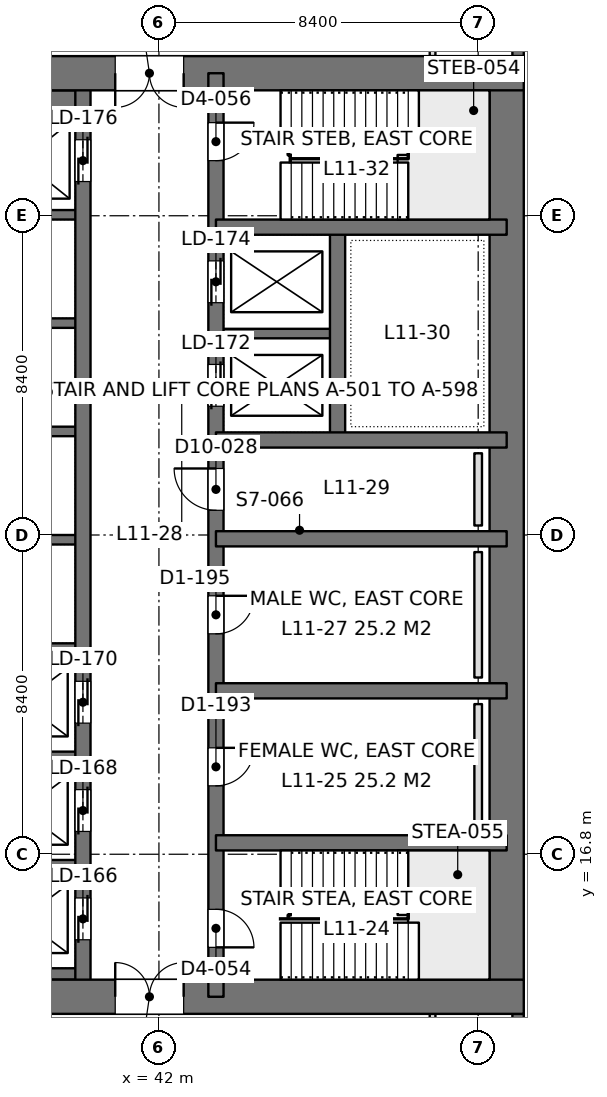
"""IFC4 building model, lengths in metres.
Left out: names, types, materials, properties, quantities, classifications, styles, units other than length and angle.
Written with IfcOpenShell. Run it as: python <this file> out.ifc"""

import sys

from ifc_helpers import new_model, si_unit, direction, frame, frame_2d, origin, place, context, subcontext, project, spatial, rectangle, extrude, element, fill, save


model = new_model("IFC4")
c1 = context("Model", 3, precision=1e-05, world=origin(), true_north=direction((0.0, 1.0)))
c2 = subcontext(c1, "Body", "Model", "MODEL_VIEW")
j1 = project(units=[si_unit("LENGTHUNIT", "METRE"), si_unit("PLANEANGLEUNIT", "RADIAN")], contexts=[c1])
p1 = place(None, origin())
s1 = spatial("IfcSite", under=j1, at=p1, CompositionType="ELEMENT")
p2 = place(p1, origin())
s2 = spatial("IfcBuilding", under=s1, at=p2, CompositionType="ELEMENT")
p3 = place(p2, frame((0.0, 0.0, 50.4)))
s3 = spatial("IfcBuildingStorey", under=s2, at=p3, CompositionType="ELEMENT", Elevation=50.4)
p4 = place(p3, frame((33.6, 13.05, 0.0), z_axis=(0.0, 0.0, 1.0), x_axis=(1.0, 0.0, 0.0)))
e1 = element("IfcWall", 1, at=p4, inside=s3, PredefinedType="SHEAR", context=c2, shape_type="SweptSolid", body=[
    extrude(rectangle(XDim=18.0, YDim=0.9, at=frame_2d((9.0, 0.0))), origin(), (0.0, 0.0, 1.0), 4.5),
])
p5 = place(p4, frame((7.25, 0.0, 0.0)))
e2 = element("IfcOpeningElement", 2, at=p5, cuts=e1, PredefinedType="OPENING", context=c2, shape_type="SweptSolid", body=[
    extrude(rectangle(XDim=1.8, YDim=2.4, at=frame_2d((0.9, 1.2))), frame((0.0, 0.46, 0.0), z_axis=(0.0, -1.0, 0.0), x_axis=(1.0, 0.0, 0.0)), (0.0, 0.0, 1.0), 0.92),
])
p6 = place(p3, frame((33.6, 37.35, 0.0), z_axis=(0.0, 0.0, 1.0), x_axis=(1.0, 0.0, 0.0)))
e3 = element("IfcWall", 3, at=p6, inside=s3, PredefinedType="SHEAR", context=c2, shape_type="SweptSolid", body=[
    extrude(rectangle(XDim=18.0, YDim=0.9, at=frame_2d((9.0, 0.0))), origin(), (0.0, 0.0, 1.0), 4.5),
])
p7 = place(p6, frame((7.25, 0.0, 0.0)))
e4 = element("IfcOpeningElement", 4, at=p7, cuts=e3, PredefinedType="OPENING", context=c2, shape_type="SweptSolid", body=[
    extrude(rectangle(XDim=1.8, YDim=2.4, at=frame_2d((0.9, 1.2))), frame((0.0, 0.46, 0.0), z_axis=(0.0, -1.0, 0.0), x_axis=(1.0, 0.0, 0.0)), (0.0, 0.0, 1.0), 0.92),
])
p8 = place(p3, frame((51.15, 13.05, 0.0), z_axis=(0.0, 0.0, 1.0), x_axis=(0.0, 1.0, 0.0)))
e5 = element("IfcWall", 5, at=p8, inside=s3, PredefinedType="SHEAR", context=c2, shape_type="SweptSolid", body=[
    extrude(rectangle(XDim=24.3, YDim=0.9, at=frame_2d((12.15, 0.0))), origin(), (0.0, 0.0, 1.0), 4.5),
])
p9 = place(p3, frame((43.5, 13.05, 0.0), z_axis=(0.0, 0.0, 1.0), x_axis=(0.0, 1.0, 0.0)))
e6 = element("IfcWall", 6, at=p9, inside=s3, PredefinedType="SHEAR", context=c2, shape_type="SweptSolid", body=[
    extrude(rectangle(XDim=24.3, YDim=0.4, at=frame_2d((12.15, 0.0))), origin(), (0.0, 0.0, 1.0), 4.5),
])
p10 = place(p9, frame((1.3, 0.0, 0.0)))
e7 = element("IfcOpeningElement", 7, at=p10, cuts=e6, PredefinedType="OPENING", context=c2, shape_type="SweptSolid", body=[
    extrude(rectangle(XDim=1.0, YDim=2.2, at=frame_2d((0.5, 1.1))), frame((0.0, 0.21, 0.0), z_axis=(0.0, -1.0, 0.0), x_axis=(1.0, 0.0, 0.0)), (0.0, 0.0, 1.0), 0.42),
])
p11 = place(p9, frame((22.0, 0.0, 0.0)))
e8 = element("IfcOpeningElement", 8, at=p11, cuts=e6, PredefinedType="OPENING", context=c2, shape_type="SweptSolid", body=[
    extrude(rectangle(XDim=1.0, YDim=2.2, at=frame_2d((0.5, 1.1))), frame((0.0, 0.21, 0.0), z_axis=(0.0, -1.0, 0.0), x_axis=(1.0, 0.0, 0.0)), (0.0, 0.0, 1.0), 0.42),
])
p12 = place(p9, frame((5.55, 0.0, 0.0)))
e9 = element("IfcOpeningElement", 9, at=p12, cuts=e6, PredefinedType="OPENING", context=c2, shape_type="SweptSolid", body=[
    extrude(rectangle(XDim=1.0, YDim=2.2, at=frame_2d((0.5, 1.1))), frame((0.0, 0.21, 0.0), z_axis=(0.0, -1.0, 0.0), x_axis=(1.0, 0.0, 0.0)), (0.0, 0.0, 1.0), 0.42),
])
p13 = place(p9, frame((9.55, 0.0, 0.0)))
e10 = element("IfcOpeningElement", 10, at=p13, cuts=e6, PredefinedType="OPENING", context=c2, shape_type="SweptSolid", body=[
    extrude(rectangle(XDim=1.0, YDim=2.2, at=frame_2d((0.5, 1.1))), frame((0.0, 0.21, 0.0), z_axis=(0.0, -1.0, 0.0), x_axis=(1.0, 0.0, 0.0)), (0.0, 0.0, 1.0), 0.42),
])
p14 = place(p9, frame((12.8, 0.0, 0.0)))
e11 = element("IfcOpeningElement", 11, at=p14, cuts=e6, PredefinedType="OPENING", context=c2, shape_type="SweptSolid", body=[
    extrude(rectangle(XDim=1.1, YDim=2.2, at=frame_2d((0.55, 1.1))), frame((0.0, 0.21, 0.0), z_axis=(0.0, -1.0, 0.0), x_axis=(1.0, 0.0, 0.0)), (0.0, 0.0, 1.0), 0.42),
])
p15 = place(p9, frame((15.538, 0.0, 0.0)))
e12 = element("IfcOpeningElement", 12, at=p15, cuts=e6, PredefinedType="OPENING", context=c2, shape_type="SweptSolid", body=[
    extrude(rectangle(XDim=1.1, YDim=2.2, at=frame_2d((0.55, 1.1))), frame((0.0, 0.21, 0.0), z_axis=(0.0, -1.0, 0.0), x_axis=(1.0, 0.0, 0.0)), (0.0, 0.0, 1.0), 0.42),
])
p16 = place(p9, frame((18.262, 0.0, 0.0)))
e13 = element("IfcOpeningElement", 13, at=p16, cuts=e6, PredefinedType="OPENING", context=c2, shape_type="SweptSolid", body=[
    extrude(rectangle(XDim=1.1, YDim=2.2, at=frame_2d((0.55, 1.1))), frame((0.0, 0.21, 0.0), z_axis=(0.0, -1.0, 0.0), x_axis=(1.0, 0.0, 0.0)), (0.0, 0.0, 1.0), 0.42),
])
p17 = place(p3, frame((40.0, 13.05, 0.0), z_axis=(0.0, 0.0, 1.0), x_axis=(0.0, 1.0, 0.0)))
e14 = element("IfcWall", 14, at=p17, inside=s3, PredefinedType="SHEAR", context=c2, shape_type="SweptSolid", body=[
    extrude(rectangle(XDim=24.3, YDim=0.4, at=frame_2d((12.15, 0.0))), origin(), (0.0, 0.0, 1.0), 4.5),
])
p18 = place(p17, frame((1.5, 0.0, 0.0)))
e15 = element("IfcOpeningElement", 15, at=p18, cuts=e14, PredefinedType="OPENING", context=c2, shape_type="SweptSolid", body=[
    extrude(rectangle(XDim=1.1, YDim=2.2, at=frame_2d((0.55, 1.1))), frame((0.0, 0.21, 0.0), z_axis=(0.0, -1.0, 0.0), x_axis=(1.0, 0.0, 0.0)), (0.0, 0.0, 1.0), 0.42),
])
p19 = place(p17, frame((4.35, 0.0, 0.0)))
e16 = element("IfcOpeningElement", 16, at=p19, cuts=e14, PredefinedType="OPENING", context=c2, shape_type="SweptSolid", body=[
    extrude(rectangle(XDim=1.1, YDim=2.2, at=frame_2d((0.55, 1.1))), frame((0.0, 0.21, 0.0), z_axis=(0.0, -1.0, 0.0), x_axis=(1.0, 0.0, 0.0)), (0.0, 0.0, 1.0), 0.42),
])
p20 = place(p17, frame((7.2, 0.0, 0.0)))
e17 = element("IfcOpeningElement", 17, at=p20, cuts=e14, PredefinedType="OPENING", context=c2, shape_type="SweptSolid", body=[
    extrude(rectangle(XDim=1.1, YDim=2.2, at=frame_2d((0.55, 1.1))), frame((0.0, 0.21, 0.0), z_axis=(0.0, -1.0, 0.0), x_axis=(1.0, 0.0, 0.0)), (0.0, 0.0, 1.0), 0.42),
])
p21 = place(p17, frame((21.45, 0.0, 0.0)))
e18 = element("IfcOpeningElement", 18, at=p21, cuts=e14, PredefinedType="OPENING", context=c2, shape_type="SweptSolid", body=[
    extrude(rectangle(XDim=1.1, YDim=2.2, at=frame_2d((0.55, 1.1))), frame((0.0, 0.21, 0.0), z_axis=(0.0, -1.0, 0.0), x_axis=(1.0, 0.0, 0.0)), (0.0, 0.0, 1.0), 0.42),
])
for number, where, z_axis, x_axis in (
    (19, (51.15, 17.1, 0.0), (0.0, 0.0, 1.0), (-1.0, 0.0, 0.0)),
    (20, (51.15, 21.1, 0.0), (0.0, 0.0, 1.0), (-1.0, 0.0, 0.0)),
    (21, (51.15, 25.1, 0.0), (0.0, 0.0, 1.0), (-1.0, 0.0, 0.0)),
    (22, (51.15, 27.7, 0.0), (0.0, 0.0, 1.0), (-1.0, 0.0, 0.0)),
    (23, (51.15, 33.3, 0.0), (0.0, 0.0, 1.0), (-1.0, 0.0, 0.0)),
):
    element("IfcWall", number, at=place(p3, frame(where, z_axis=z_axis, x_axis=x_axis)), inside=s3, PredefinedType="SHEAR", context=c2, shape_type="SweptSolid", body=[
        extrude(rectangle(XDim=7.65, YDim=0.4, at=frame_2d((3.825, 0.0))), origin(), (0.0, 0.0, 1.0), 4.5),
    ])
p22 = place(p3, frame((46.7, 27.7, 0.0), z_axis=(0.0, 0.0, 1.0), x_axis=(0.0, 1.0, 0.0)))
e24 = element("IfcWall", 24, at=p22, inside=s3, PredefinedType="SHEAR", context=c2, shape_type="SweptSolid", body=[
    extrude(rectangle(XDim=5.6, YDim=0.4, at=frame_2d((2.8, 0.0))), origin(), (0.0, 0.0, 1.0), 4.5),
])
p23 = place(p3, frame((46.7, 30.5, 0.0), z_axis=(0.0, 0.0, 1.0), x_axis=(-1.0, 0.0, 0.0)))
e25 = element("IfcWall", 25, at=p23, inside=s3, PredefinedType="SHEAR", context=c2, shape_type="SweptSolid", body=[
    extrude(rectangle(XDim=3.2, YDim=0.25, at=frame_2d((1.6, 0.0))), origin(), (0.0, 0.0, 1.0), 4.5),
])
p24 = place(p3, frame((40.0, 13.65, 0.0), z_axis=(0.0, 0.0, 1.0), x_axis=(-1.0, 0.0, 0.0)))
e26 = element("IfcWall", 26, at=p24, inside=s3, PredefinedType="SHEAR", context=c2, shape_type="SweptSolid", body=[
    extrude(rectangle(XDim=3.2, YDim=0.3, at=frame_2d((1.6, 0.0))), origin(), (0.0, 0.0, 1.0), 4.5),
])
for number, where, z_axis, x_axis in (
    (27, (40.0, 16.525, 0.0), (0.0, 0.0, 1.0), (-1.0, 0.0, 0.0)),
    (28, (40.0, 19.375, 0.0), (0.0, 0.0, 1.0), (-1.0, 0.0, 0.0)),
    (29, (40.0, 22.225, 0.0), (0.0, 0.0, 1.0), (-1.0, 0.0, 0.0)),
    (30, (40.0, 25.075, 0.0), (0.0, 0.0, 1.0), (-1.0, 0.0, 0.0)),
    (31, (40.0, 27.925, 0.0), (0.0, 0.0, 1.0), (-1.0, 0.0, 0.0)),
    (32, (40.0, 30.775, 0.0), (0.0, 0.0, 1.0), (-1.0, 0.0, 0.0)),
    (33, (40.0, 33.625, 0.0), (0.0, 0.0, 1.0), (-1.0, 0.0, 0.0)),
):
    element("IfcWall", number, at=place(p3, frame(where, z_axis=z_axis, x_axis=x_axis)), inside=s3, PredefinedType="SHEAR", context=c2, shape_type="SweptSolid", body=[
        extrude(rectangle(XDim=3.2, YDim=0.25, at=frame_2d((1.6, 0.0))), origin(), (0.0, 0.0, 1.0), 4.5),
    ])
p25 = place(p3, frame((40.0, 36.625, 0.0), z_axis=(0.0, 0.0, 1.0), x_axis=(-1.0, 0.0, 0.0)))
e34 = element("IfcWall", 34, at=p25, inside=s3, PredefinedType="SHEAR", context=c2, shape_type="SweptSolid", body=[
    extrude(rectangle(XDim=3.2, YDim=0.55, at=frame_2d((1.6, 0.0))), origin(), (0.0, 0.0, 1.0), 4.5),
])
p26 = place(p3, frame((51.45, 42.0, 0.0), z_axis=(0.0, 0.0, 1.0), x_axis=(0.0, -1.0, 0.0)))
e35 = element("IfcWall", 35, at=p26, inside=s3, PredefinedType="SOLIDWALL", context=c2, shape_type="SweptSolid", body=[
    extrude(rectangle(XDim=4.2, YDim=0.3, at=frame_2d((2.1, 0.0))), origin(), (0.0, 0.0, 1.0), 4.34),
])
p27 = place(p26, frame((0.9, 0.0, 0.9)))
e36 = element("IfcOpeningElement", 36, at=p27, cuts=e35, PredefinedType="OPENING", context=c2, shape_type="SweptSolid", body=[
    extrude(rectangle(XDim=2.4, YDim=1.9, at=frame_2d((1.2, 0.95))), frame((0.0, 0.16, 0.0), z_axis=(0.0, -1.0, 0.0), x_axis=(1.0, 0.0, 0.0)), (0.0, 0.0, 1.0), 0.32),
])
p28 = place(p3, frame((51.45, 12.6, 0.0), z_axis=(0.0, 0.0, 1.0), x_axis=(0.0, -1.0, 0.0)))
e37 = element("IfcWall", 37, at=p28, inside=s3, PredefinedType="SOLIDWALL", context=c2, shape_type="SweptSolid", body=[
    extrude(rectangle(XDim=4.2, YDim=0.3, at=frame_2d((2.1, 0.0))), origin(), (0.0, 0.0, 1.0), 4.34),
])
p29 = place(p28, frame((0.9, 0.0, 0.9)))
e38 = element("IfcOpeningElement", 38, at=p29, cuts=e37, PredefinedType="OPENING", context=c2, shape_type="SweptSolid", body=[
    extrude(rectangle(XDim=2.4, YDim=1.9, at=frame_2d((1.2, 0.95))), frame((0.0, 0.16, 0.0), z_axis=(0.0, -1.0, 0.0), x_axis=(1.0, 0.0, 0.0)), (0.0, 0.0, 1.0), 0.32),
])
p30 = place(p3, frame((49.2, 10.8, 0.0), z_axis=(0.0, 0.0, 1.0), x_axis=(0.0, 1.0, 0.0)))
e39 = element("IfcWall", 39, at=p30, inside=s3, PredefinedType="PARTITIONING", context=c2, shape_type="SweptSolid", body=[
    extrude(rectangle(XDim=1.802, YDim=0.15, at=frame_2d((0.901, 0.0))), origin(), (0.0, 0.0, 1.0), 4.34),
])
p31 = place(p3, frame((49.2, 37.8, 0.0), z_axis=(0.0, 0.0, 1.0), x_axis=(0.0, 1.0, 0.0)))
e40 = element("IfcWall", 40, at=p31, inside=s3, PredefinedType="PARTITIONING", context=c2, shape_type="SweptSolid", body=[
    extrude(rectangle(XDim=1.8, YDim=0.15, at=frame_2d((0.9, 0.0))), origin(), (0.0, 0.0, 1.0), 4.34),
])
for number, where, z_axis, x_axis in (
    (41, (50.4, 17.45, 0.0), (0.0, 0.0, 1.0), (0.0, 1.0, 0.0)),
    (42, (50.4, 21.45, 0.0), (0.0, 0.0, 1.0), (0.0, 1.0, 0.0)),
):
    element("IfcWall", number, at=place(p3, frame(where, z_axis=z_axis, x_axis=x_axis)), inside=s3, PredefinedType="PLUMBINGWALL", context=c2, shape_type="SweptSolid", body=[
        extrude(rectangle(XDim=3.3, YDim=0.2, at=frame_2d((1.65, 0.0))), origin(), (0.0, 0.0, 1.0), 1.2),
    ])
p32 = place(p3, frame((50.4, 25.45, 0.0), z_axis=(0.0, 0.0, 1.0), x_axis=(0.0, 1.0, 0.0)))
e43 = element("IfcWall", 43, at=p32, inside=s3, PredefinedType="PLUMBINGWALL", context=c2, shape_type="SweptSolid", body=[
    extrude(rectangle(XDim=1.9, YDim=0.2, at=frame_2d((0.95, 0.0))), origin(), (0.0, 0.0, 1.0), 1.2),
])
p33 = place(p5, origin())
e44 = element("IfcDoor", 44, at=p33, inside=s3, OperationType="DOUBLE_DOOR_SINGLE_SWING", PredefinedType="DOOR", context=c2, shape_type="SweptSolid", body=[
    extrude(rectangle(XDim=1.8, YDim=2.4, at=frame_2d((0.9, 1.2))), frame((0.0, 0.025, 0.0), z_axis=(0.0, -1.0, 0.0), x_axis=(1.0, 0.0, 0.0)), (0.0, 0.0, 1.0), 0.05),
])
fill(e2, e44)
p34 = place(p7, frame((1.8, 0.0, 0.0), z_axis=(0.0, 0.0, 1.0), x_axis=(-1.0, 0.0, 0.0)))
e45 = element("IfcDoor", 45, at=p34, inside=s3, OperationType="DOUBLE_DOOR_SINGLE_SWING", PredefinedType="DOOR", context=c2, shape_type="SweptSolid", body=[
    extrude(rectangle(XDim=1.8, YDim=2.4, at=frame_2d((0.9, 1.2))), frame((0.0, 0.025, 0.0), z_axis=(0.0, -1.0, 0.0), x_axis=(1.0, 0.0, 0.0)), (0.0, 0.0, 1.0), 0.05),
])
fill(e4, e45)
p35 = place(p10, frame((1.0, 0.0, 0.0), z_axis=(0.0, 0.0, 1.0), x_axis=(-1.0, 0.0, 0.0)))
e46 = element("IfcDoor", 46, at=p35, inside=s3, OperationType="SINGLE_SWING_RIGHT", PredefinedType="DOOR", context=c2, shape_type="SweptSolid", body=[
    extrude(rectangle(XDim=1.0, YDim=2.2, at=frame_2d((0.5, 1.1))), frame((0.0, 0.025, 0.0), z_axis=(0.0, -1.0, 0.0), x_axis=(1.0, 0.0, 0.0)), (0.0, 0.0, 1.0), 0.05),
])
fill(e7, e46)
p36 = place(p11, frame((1.0, 0.0, 0.0), z_axis=(0.0, 0.0, 1.0), x_axis=(-1.0, 0.0, 0.0)))
e47 = element("IfcDoor", 47, at=p36, inside=s3, OperationType="SINGLE_SWING_LEFT", PredefinedType="DOOR", context=c2, shape_type="SweptSolid", body=[
    extrude(rectangle(XDim=1.0, YDim=2.2, at=frame_2d((0.5, 1.1))), frame((0.0, 0.025, 0.0), z_axis=(0.0, -1.0, 0.0), x_axis=(1.0, 0.0, 0.0)), (0.0, 0.0, 1.0), 0.05),
])
fill(e8, e47)
p37 = place(p12, frame((1.0, 0.0, 0.0), z_axis=(0.0, 0.0, 1.0), x_axis=(-1.0, 0.0, 0.0)))
e48 = element("IfcDoor", 48, at=p37, inside=s3, OperationType="SINGLE_SWING_LEFT", PredefinedType="DOOR", context=c2, shape_type="SweptSolid", body=[
    extrude(rectangle(XDim=1.0, YDim=2.2, at=frame_2d((0.5, 1.1))), frame((0.0, 0.025, 0.0), z_axis=(0.0, -1.0, 0.0), x_axis=(1.0, 0.0, 0.0)), (0.0, 0.0, 1.0), 0.05),
])
fill(e9, e48)
p38 = place(p13, frame((1.0, 0.0, 0.0), z_axis=(0.0, 0.0, 1.0), x_axis=(-1.0, 0.0, 0.0)))
e49 = element("IfcDoor", 49, at=p38, inside=s3, OperationType="SINGLE_SWING_LEFT", PredefinedType="DOOR", context=c2, shape_type="SweptSolid", body=[
    extrude(rectangle(XDim=1.0, YDim=2.2, at=frame_2d((0.5, 1.1))), frame((0.0, 0.025, 0.0), z_axis=(0.0, -1.0, 0.0), x_axis=(1.0, 0.0, 0.0)), (0.0, 0.0, 1.0), 0.05),
])
fill(e10, e49)
p39 = place(p14, origin())
e50 = element("IfcDoor", 50, at=p39, inside=s3, OperationType="SINGLE_SWING_RIGHT", PredefinedType="DOOR", context=c2, shape_type="SweptSolid", body=[
    extrude(rectangle(XDim=1.1, YDim=2.2, at=frame_2d((0.55, 1.1))), frame((0.0, 0.025, 0.0), z_axis=(0.0, -1.0, 0.0), x_axis=(1.0, 0.0, 0.0)), (0.0, 0.0, 1.0), 0.05),
])
fill(e11, e50)
p40 = place(p18, origin())
e51 = element("IfcDoor", 51, at=p40, inside=s3, OperationType="DOUBLE_DOOR_SLIDING", PredefinedType="DOOR", context=c2, shape_type="SweptSolid", body=[
    extrude(rectangle(XDim=1.1, YDim=2.2, at=frame_2d((0.55, 1.1))), frame((0.0, 0.025, 0.0), z_axis=(0.0, -1.0, 0.0), x_axis=(1.0, 0.0, 0.0)), (0.0, 0.0, 1.0), 0.05),
])
fill(e15, e51)
p41 = place(p19, origin())
e52 = element("IfcDoor", 52, at=p41, inside=s3, OperationType="DOUBLE_DOOR_SLIDING", PredefinedType="DOOR", context=c2, shape_type="SweptSolid", body=[
    extrude(rectangle(XDim=1.1, YDim=2.2, at=frame_2d((0.55, 1.1))), frame((0.0, 0.025, 0.0), z_axis=(0.0, -1.0, 0.0), x_axis=(1.0, 0.0, 0.0)), (0.0, 0.0, 1.0), 0.05),
])
fill(e16, e52)
p42 = place(p20, origin())
e53 = element("IfcDoor", 53, at=p42, inside=s3, OperationType="DOUBLE_DOOR_SLIDING", PredefinedType="DOOR", context=c2, shape_type="SweptSolid", body=[
    extrude(rectangle(XDim=1.1, YDim=2.2, at=frame_2d((0.55, 1.1))), frame((0.0, 0.025, 0.0), z_axis=(0.0, -1.0, 0.0), x_axis=(1.0, 0.0, 0.0)), (0.0, 0.0, 1.0), 0.05),
])
fill(e17, e53)
p43 = place(p21, origin())
e54 = element("IfcDoor", 54, at=p43, inside=s3, OperationType="DOUBLE_DOOR_SLIDING", PredefinedType="DOOR", context=c2, shape_type="SweptSolid", body=[
    extrude(rectangle(XDim=1.1, YDim=2.2, at=frame_2d((0.55, 1.1))), frame((0.0, 0.025, 0.0), z_axis=(0.0, -1.0, 0.0), x_axis=(1.0, 0.0, 0.0)), (0.0, 0.0, 1.0), 0.05),
])
fill(e18, e54)
p44 = place(p15, origin())
e55 = element("IfcDoor", 55, at=p44, inside=s3, OperationType="DOUBLE_DOOR_SLIDING", PredefinedType="DOOR", context=c2, shape_type="SweptSolid", body=[
    extrude(rectangle(XDim=1.1, YDim=2.2, at=frame_2d((0.55, 1.1))), frame((0.0, 0.025, 0.0), z_axis=(0.0, -1.0, 0.0), x_axis=(1.0, 0.0, 0.0)), (0.0, 0.0, 1.0), 0.05),
])
fill(e12, e55)
p45 = place(p16, origin())
e56 = element("IfcDoor", 56, at=p45, inside=s3, OperationType="DOUBLE_DOOR_SLIDING", PredefinedType="DOOR", context=c2, shape_type="SweptSolid", body=[
    extrude(rectangle(XDim=1.1, YDim=2.2, at=frame_2d((0.55, 1.1))), frame((0.0, 0.025, 0.0), z_axis=(0.0, -1.0, 0.0), x_axis=(1.0, 0.0, 0.0)), (0.0, 0.0, 1.0), 0.05),
])
fill(e13, e56)
save(model, sys.argv[1])
